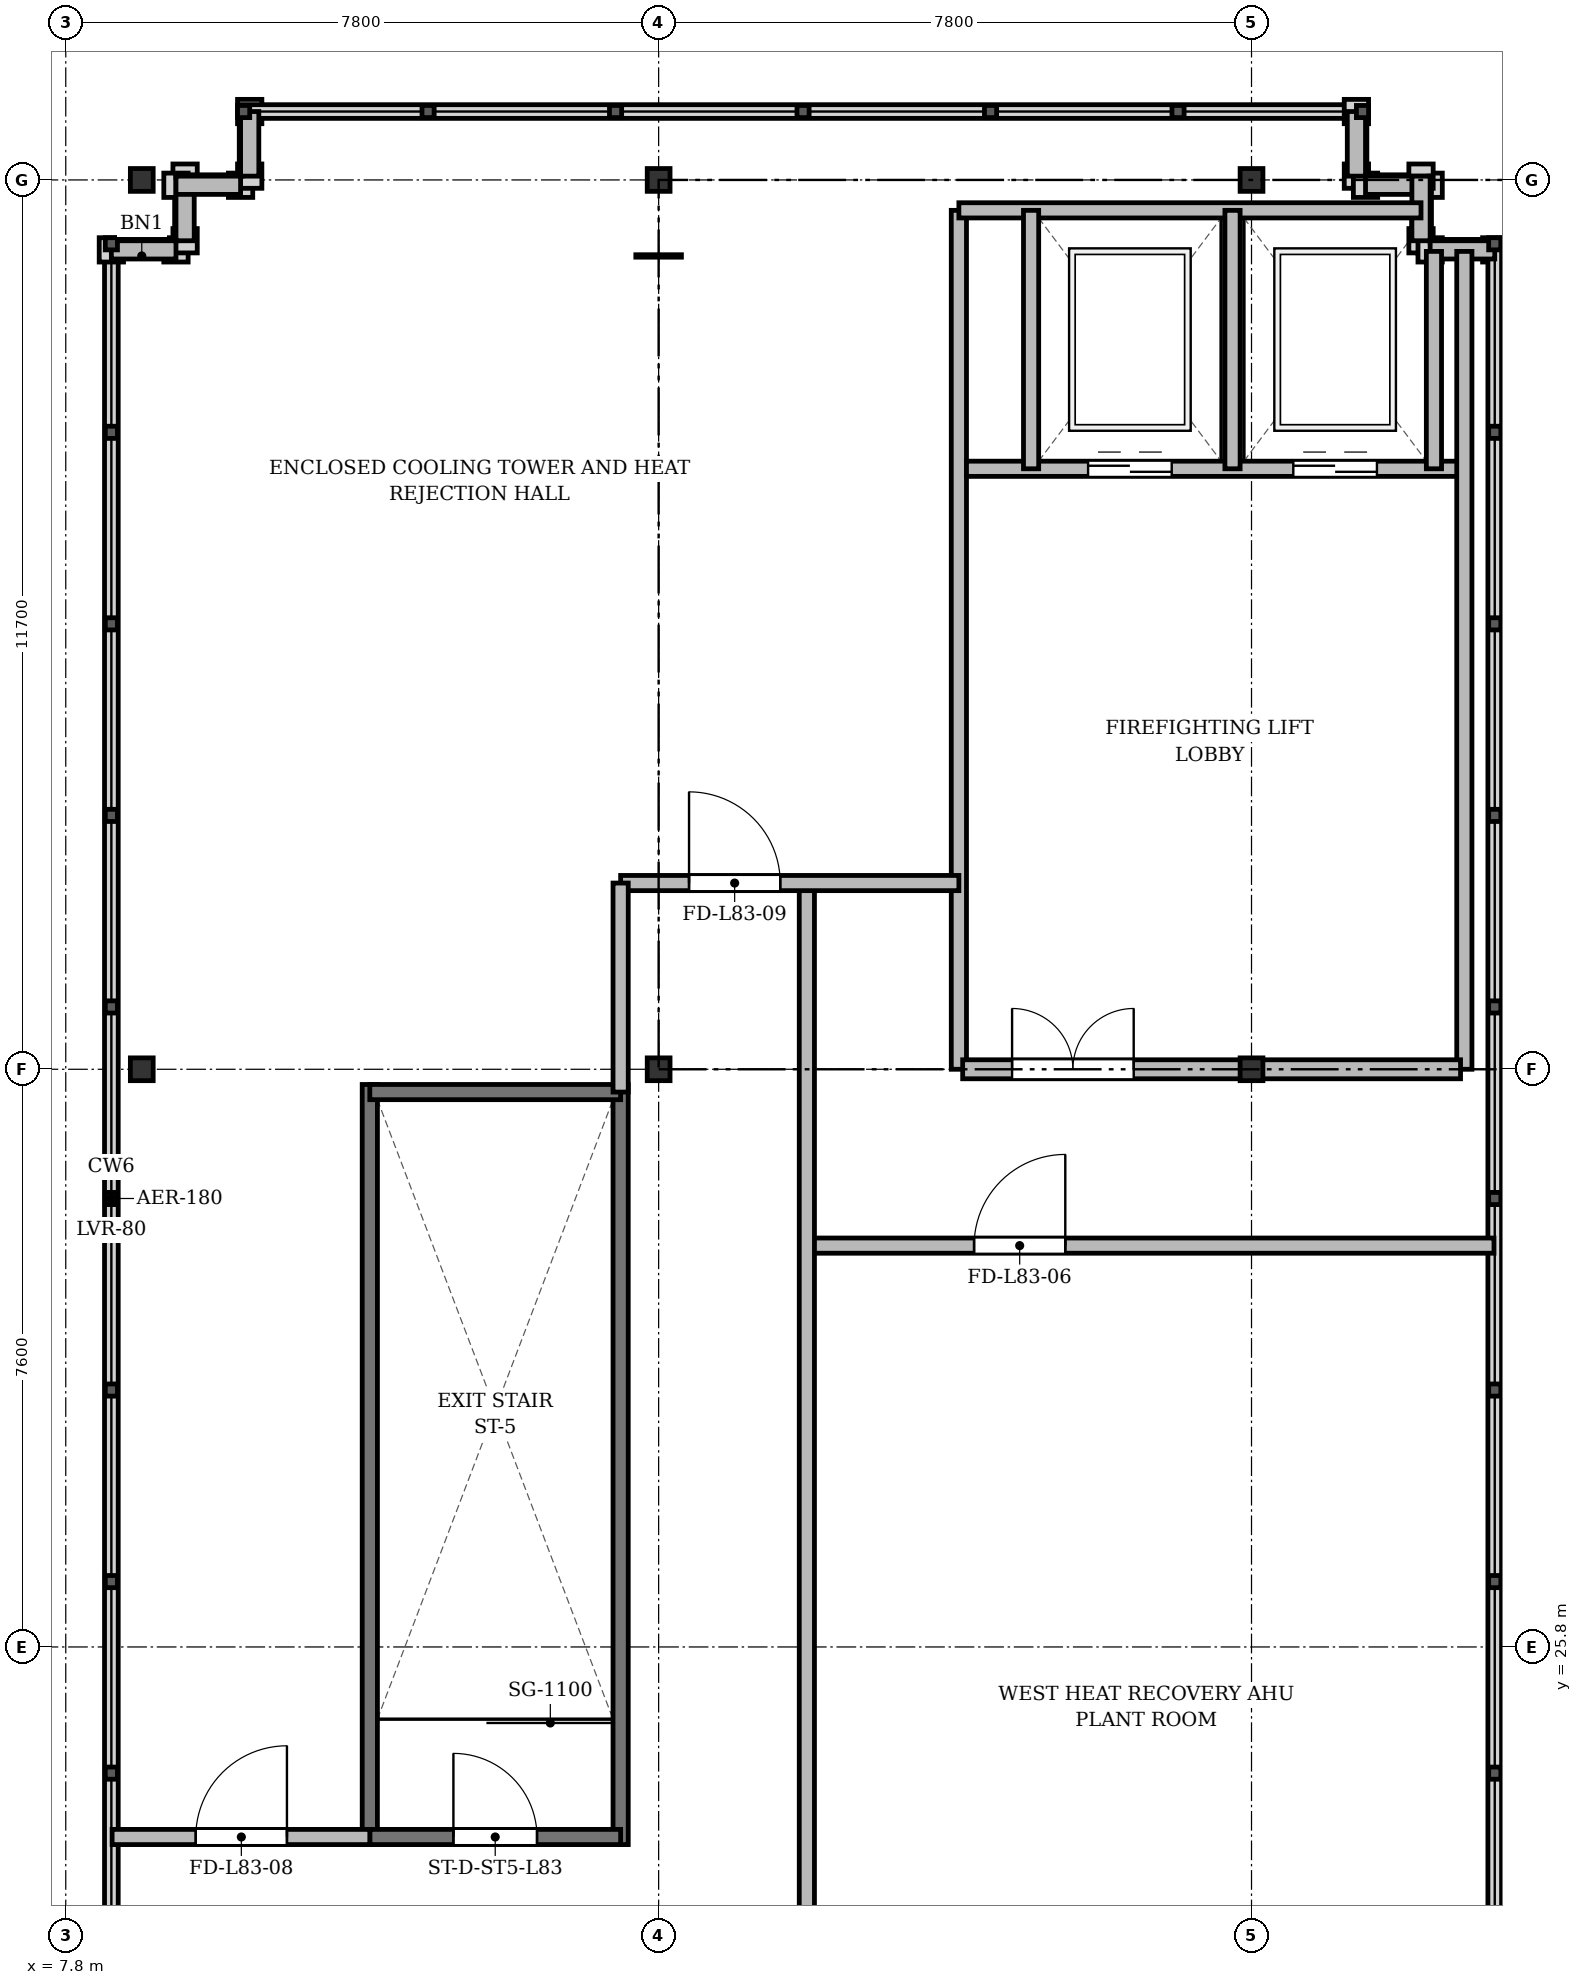
"""IFC4 building model, lengths in metres.
Left out: names, types, materials, properties, quantities, classifications, styles, units other than length and angle.
Written with IfcOpenShell. Run it as: python <this file> out.ifc"""

import sys

from ifc_helpers import new_model, si_unit, direction, frame, frame_2d, origin, origin_2d, place, context, subcontext, project, spatial, rectangle, i_section, extrude, source, transform, mapped, element, fill, save


model = new_model("IFC4")
c1 = context("Model", 3, precision=1e-05, world=origin(), true_north=direction((0.0, 1.0)))
c2 = subcontext(c1, "Body", "Model", "MODEL_VIEW")
j1 = project(units=[si_unit("LENGTHUNIT", "METRE"), si_unit("PLANEANGLEUNIT", "RADIAN")], contexts=[c1])
p1 = place(None, origin())
s1 = spatial("IfcSite", under=j1, at=p1, CompositionType="ELEMENT")
p2 = place(p1, origin())
s2 = spatial("IfcBuilding", under=s1, at=p2, CompositionType="ELEMENT")
p3 = place(p2, frame((0.0, 0.0, 320.9)))
s3 = spatial("IfcBuildingStorey", under=s2, at=p3, CompositionType="ELEMENT", Elevation=320.9)
m1 = source(origin(), c2, "Body", "SweptSolid", [
    extrude(i_section(OverallWidth=0.3, OverallDepth=0.3, WebThickness=0.015, FlangeThickness=0.024, at=origin_2d()), origin(), (0.0, 0.0, 1.0), 4.2),
])
for number, where, z_axis, x_axis in (
    (1, (8.8, 33.4, 0.0), (0.0, 0.0, 1.0), (1.0, 0.0, 0.0)),
    (2, (8.8, 45.1, 0.0), (0.0, 0.0, 1.0), (1.0, 0.0, 0.0)),
    (3, (15.6, 33.4, 0.0), (0.0, 0.0, 1.0), (1.0, 0.0, 0.0)),
    (4, (15.6, 45.1, 0.0), (0.0, 0.0, 1.0), (1.0, 0.0, 0.0)),
    (5, (23.4, 33.4, 0.0), (0.0, 0.0, 1.0), (1.0, 0.0, 0.0)),
    (6, (23.4, 45.1, 0.0), (0.0, 0.0, 1.0), (1.0, 0.0, 0.0)),
):
    element("IfcColumn", number, at=place(p3, frame(where, z_axis=z_axis, x_axis=x_axis)), inside=s3, PredefinedType="COLUMN", context=c2, shape_type="MappedRepresentation", body=[
        mapped(m1, transform((0.0, 0.0, 0.0), x_axis=(1.0, 0.0, 0.0), y_axis=(0.0, 1.0, 0.0), z_axis=(0.0, 0.0, 1.0), scale=1.0)),
    ])
p4 = place(p3, frame((8.4, 44.18, 0.0), z_axis=(0.0, 0.0, 1.0), x_axis=(1.0, 0.0, 0.0)))
e7 = element("IfcWall", 7, at=p4, inside=s3, PredefinedType="SOLIDWALL", context=c2, shape_type="SweptSolid", body=[
    extrude(rectangle(XDim=0.85, YDim=0.24, at=frame_2d((0.425, 0.0))), origin(), (0.0, 0.0, 1.0), 3.4),
])
p5 = place(p3, frame((9.37, 44.3, 0.0), z_axis=(0.0, 0.0, 1.0), x_axis=(0.0, 1.0, 0.0)))
e8 = element("IfcWall", 8, at=p5, inside=s3, PredefinedType="SOLIDWALL", context=c2, shape_type="SweptSolid", body=[
    extrude(rectangle(XDim=0.85, YDim=0.24, at=frame_2d((0.425, 0.0))), origin(), (0.0, 0.0, 1.0), 3.4),
])
for number, where, z_axis, x_axis in (
    (9, (9.25, 45.03, 0.0), (0.0, 0.0, 1.0), (1.0, 0.0, 0.0)),
    (10, (10.22, 45.15, 0.0), (0.0, 0.0, 1.0), (0.0, 1.0, 0.0)),
    (11, (24.78, 46.0, 0.0), (0.0, 0.0, 1.0), (0.0, -1.0, 0.0)),
    (12, (24.9, 45.03, 0.0), (0.0, 0.0, 1.0), (1.0, 0.0, 0.0)),
):
    element("IfcWall", number, at=place(p3, frame(where, z_axis=z_axis, x_axis=x_axis)), inside=s3, PredefinedType="SOLIDWALL", context=c2, shape_type="SweptSolid", body=[
        extrude(rectangle(XDim=0.85, YDim=0.24, at=frame_2d((0.425, 0.0))), origin(), (0.0, 0.0, 1.0), 3.4),
    ])
p6 = place(p3, frame((25.63, 45.15, 0.0), z_axis=(0.0, 0.0, 1.0), x_axis=(0.0, -1.0, 0.0)))
e13 = element("IfcWall", 13, at=p6, inside=s3, PredefinedType="SOLIDWALL", context=c2, shape_type="SweptSolid", body=[
    extrude(rectangle(XDim=0.85, YDim=0.24, at=frame_2d((0.425, 0.0))), origin(), (0.0, 0.0, 1.0), 3.4),
])
p7 = place(p3, frame((25.75, 44.18, 0.0), z_axis=(0.0, 0.0, 1.0), x_axis=(1.0, 0.0, 0.0)))
e14 = element("IfcWall", 14, at=p7, inside=s3, PredefinedType="SOLIDWALL", context=c2, shape_type="SweptSolid", body=[
    extrude(rectangle(XDim=0.85, YDim=0.24, at=frame_2d((0.425, 0.0))), origin(), (0.0, 0.0, 1.0), 3.9),
])
for number, where, z_axis, x_axis in (
    (15, (11.8, 23.2, 0.0), (0.0, 0.0, 1.0), (0.0, 1.0, 0.0)),
    (16, (15.1, 23.2, 0.0), (0.0, 0.0, 1.0), (0.0, 1.0, 0.0)),
):
    element("IfcWall", number, at=place(p3, frame(where, z_axis=z_axis, x_axis=x_axis)), inside=s3, PredefinedType="SHEAR", context=c2, shape_type="SweptSolid", body=[
        extrude(rectangle(XDim=10.0, YDim=0.2, at=frame_2d((5.0, 0.0))), origin(), (0.0, 0.0, 1.0), 3.9),
    ])
p8 = place(p3, frame((11.8, 33.1, 0.0), z_axis=(0.0, 0.0, 1.0), x_axis=(1.0, 0.0, 0.0)))
e17 = element("IfcWall", 17, at=p8, inside=s3, PredefinedType="SHEAR", context=c2, shape_type="SweptSolid", body=[
    extrude(rectangle(XDim=3.3, YDim=0.2, at=frame_2d((1.65, 0.0))), origin(), (0.0, 0.0, 1.0), 3.9),
])
p9 = place(p3, frame((11.8, 23.3, 0.0), z_axis=(0.0, 0.0, 1.0), x_axis=(1.0, 0.0, 0.0)))
e18 = element("IfcWall", 18, at=p9, inside=s3, PredefinedType="SHEAR", context=c2, shape_type="SweptSolid", body=[
    extrude(rectangle(XDim=3.3, YDim=0.2, at=frame_2d((1.65, 0.0))), origin(), (0.0, 0.0, 1.0), 3.9),
])
p10 = place(p9, frame((1.1, 0.0, 0.0)))
e19 = element("IfcOpeningElement", 19, at=p10, cuts=e18, PredefinedType="OPENING", context=c2, shape_type="SweptSolid", body=[
    extrude(rectangle(XDim=1.1, YDim=2.15, at=frame_2d((0.55, 1.075))), frame((0.0, 0.11, 0.0), z_axis=(0.0, -1.0, 0.0), x_axis=(1.0, 0.0, 0.0)), (0.0, 0.0, 1.0), 0.22),
])
p11 = place(p3, frame((19.55, 33.4, 0.0), z_axis=(0.0, 0.0, 1.0), x_axis=(0.0, 1.0, 0.0)))
e20 = element("IfcWall", 20, at=p11, inside=s3, PredefinedType="PARTITIONING", context=c2, shape_type="SweptSolid", body=[
    extrude(rectangle(XDim=11.3, YDim=0.2, at=frame_2d((5.65, 0.0))), origin(), (0.0, 0.0, 1.0), 3.4),
])
p12 = place(p3, frame((19.55, 44.7, 0.0), z_axis=(0.0, 0.0, 1.0), x_axis=(1.0, 0.0, 0.0)))
e21 = element("IfcWall", 21, at=p12, inside=s3, PredefinedType="PARTITIONING", context=c2, shape_type="SweptSolid", body=[
    extrude(rectangle(XDim=6.08, YDim=0.2, at=frame_2d((3.04, 0.0))), origin(), (0.0, 0.0, 1.0), 3.4),
])
p13 = place(p3, frame((19.65, 41.3, 0.0), z_axis=(0.0, 0.0, 1.0), x_axis=(1.0, 0.0, 0.0)))
e22 = element("IfcWall", 22, at=p13, inside=s3, PredefinedType="SOLIDWALL", context=c2, shape_type="SweptSolid", body=[
    extrude(rectangle(XDim=6.5, YDim=0.2, at=frame_2d((3.25, 0.0))), origin(), (0.0, 0.0, 1.0), 3.4),
])
p14 = place(p13, frame((1.6, 0.0, 0.0)))
e23 = element("IfcOpeningElement", 23, at=p14, cuts=e22, PredefinedType="OPENING", context=c2, shape_type="SweptSolid", body=[
    extrude(rectangle(XDim=1.1, YDim=2.15, at=frame_2d((0.55, 1.075))), frame((0.0, 0.11, 0.0), z_axis=(0.0, -1.0, 0.0), x_axis=(1.0, 0.0, 0.0)), (0.0, 0.0, 1.0), 0.22),
])
p15 = place(p13, frame((4.3, 0.0, 0.0)))
e24 = element("IfcOpeningElement", 24, at=p15, cuts=e22, PredefinedType="OPENING", context=c2, shape_type="SweptSolid", body=[
    extrude(rectangle(XDim=1.1, YDim=2.15, at=frame_2d((0.55, 1.075))), frame((0.0, 0.11, 0.0), z_axis=(0.0, -1.0, 0.0), x_axis=(1.0, 0.0, 0.0)), (0.0, 0.0, 1.0), 0.22),
])
for number, where, z_axis, x_axis in (
    (25, (20.5, 41.3, 0.0), (0.0, 0.0, 1.0), (0.0, 1.0, 0.0)),
    (26, (23.15, 41.3, 0.0), (0.0, 0.0, 1.0), (0.0, 1.0, 0.0)),
):
    element("IfcWall", number, at=place(p3, frame(where, z_axis=z_axis, x_axis=x_axis)), inside=s3, PredefinedType="SOLIDWALL", context=c2, shape_type="SweptSolid", body=[
        extrude(rectangle(XDim=3.4, YDim=0.2, at=frame_2d((1.7, 0.0))), origin(), (0.0, 0.0, 1.0), 3.9),
    ])
p16 = place(p3, frame((25.8, 41.3, 0.0), z_axis=(0.0, 0.0, 1.0), x_axis=(0.0, 1.0, 0.0)))
e27 = element("IfcWall", 27, at=p16, inside=s3, PredefinedType="SOLIDWALL", context=c2, shape_type="SweptSolid", body=[
    extrude(rectangle(XDim=2.86, YDim=0.2, at=frame_2d((1.43, 0.0))), origin(), (0.0, 0.0, 1.0), 3.9),
])
p17 = place(p3, frame((26.2, 33.4, 0.0), z_axis=(0.0, 0.0, 1.0), x_axis=(0.0, 1.0, 0.0)))
e28 = element("IfcWall", 28, at=p17, inside=s3, PredefinedType="SOLIDWALL", context=c2, shape_type="SweptSolid", body=[
    extrude(rectangle(XDim=10.76, YDim=0.2, at=frame_2d((5.38, 0.0))), origin(), (0.0, 0.0, 1.0), 3.4),
])
p18 = place(p3, frame((19.6, 33.4, 0.0), z_axis=(0.0, 0.0, 1.0), x_axis=(1.0, 0.0, 0.0)))
e29 = element("IfcWall", 29, at=p18, inside=s3, PredefinedType="PARTITIONING", context=c2, shape_type="SweptSolid", body=[
    extrude(rectangle(XDim=6.55, YDim=0.25, at=frame_2d((3.275, 0.0))), origin(), (0.0, 0.0, 1.0), 3.4),
])
p19 = place(p18, frame((0.65, 0.0, 0.0)))
e30 = element("IfcOpeningElement", 30, at=p19, cuts=e29, PredefinedType="OPENING", context=c2, shape_type="SweptSolid", body=[
    extrude(rectangle(XDim=1.6, YDim=2.2, at=frame_2d((0.8, 1.1))), frame((0.0, 0.135, 0.0), z_axis=(0.0, -1.0, 0.0), x_axis=(1.0, 0.0, 0.0)), (0.0, 0.0, 1.0), 0.27),
])
p20 = place(p3, frame((17.55, 31.08, 0.0), z_axis=(0.0, 0.0, 1.0), x_axis=(1.0, 0.0, 0.0)))
e31 = element("IfcWall", 31, at=p20, inside=s3, PredefinedType="PARTITIONING", context=c2, shape_type="SweptSolid", body=[
    extrude(rectangle(XDim=9.04, YDim=0.2, at=frame_2d((4.52, 0.0))), origin(), (0.0, 0.0, 1.0), 3.4),
])
p21 = place(p20, frame((2.2, 0.0, 0.0)))
e32 = element("IfcOpeningElement", 32, at=p21, cuts=e31, PredefinedType="OPENING", context=c2, shape_type="SweptSolid", body=[
    extrude(rectangle(XDim=1.2, YDim=2.15, at=frame_2d((0.6, 1.075))), frame((0.0, 0.11, 0.0), z_axis=(0.0, -1.0, 0.0), x_axis=(1.0, 0.0, 0.0)), (0.0, 0.0, 1.0), 0.22),
])
p22 = place(p3, frame((17.55, 17.41, 0.0), z_axis=(0.0, 0.0, 1.0), x_axis=(0.0, 1.0, 0.0)))
e33 = element("IfcWall", 33, at=p22, inside=s3, PredefinedType="PARTITIONING", context=c2, shape_type="SweptSolid", body=[
    extrude(rectangle(XDim=18.44, YDim=0.2, at=frame_2d((9.22, 0.0))), origin(), (0.0, 0.0, 1.0), 3.4),
])
p23 = place(p3, frame((8.41, 23.3, 0.0), z_axis=(0.0, 0.0, 1.0), x_axis=(1.0, 0.0, 0.0)))
e34 = element("IfcWall", 34, at=p23, inside=s3, PredefinedType="PARTITIONING", context=c2, shape_type="SweptSolid", body=[
    extrude(rectangle(XDim=3.39, YDim=0.2, at=frame_2d((1.695, 0.0))), origin(), (0.0, 0.0, 1.0), 3.4),
])
p24 = place(p23, frame((1.1, 0.0, 0.0)))
e35 = element("IfcOpeningElement", 35, at=p24, cuts=e34, PredefinedType="OPENING", context=c2, shape_type="SweptSolid", body=[
    extrude(rectangle(XDim=1.2, YDim=2.15, at=frame_2d((0.6, 1.075))), frame((0.0, 0.11, 0.0), z_axis=(0.0, -1.0, 0.0), x_axis=(1.0, 0.0, 0.0)), (0.0, 0.0, 1.0), 0.22),
])
p25 = place(p3, frame((15.1, 35.85, 0.0), z_axis=(0.0, 0.0, 1.0), x_axis=(1.0, 0.0, 0.0)))
e36 = element("IfcWall", 36, at=p25, inside=s3, PredefinedType="PARTITIONING", context=c2, shape_type="SweptSolid", body=[
    extrude(rectangle(XDim=4.45, YDim=0.2, at=frame_2d((2.225, 0.0))), origin(), (0.0, 0.0, 1.0), 3.4),
])
p26 = place(p25, frame((0.9, 0.0, 0.0)))
e37 = element("IfcOpeningElement", 37, at=p26, cuts=e36, PredefinedType="OPENING", context=c2, shape_type="SweptSolid", body=[
    extrude(rectangle(XDim=1.2, YDim=2.15, at=frame_2d((0.6, 1.075))), frame((0.0, 0.11, 0.0), z_axis=(0.0, -1.0, 0.0), x_axis=(1.0, 0.0, 0.0)), (0.0, 0.0, 1.0), 0.22),
])
p27 = place(p3, frame((15.1, 33.1, 0.0), z_axis=(0.0, 0.0, 1.0), x_axis=(0.0, 1.0, 0.0)))
e38 = element("IfcWall", 38, at=p27, inside=s3, PredefinedType="PARTITIONING", context=c2, shape_type="SweptSolid", body=[
    extrude(rectangle(XDim=2.75, YDim=0.2, at=frame_2d((1.375, 0.0))), origin(), (0.0, 0.0, 1.0), 3.4),
])
m2 = source(origin(), c2, "Body", "SweptSolid", [
    extrude(rectangle(XDim=1.1, YDim=2.15, at=frame_2d((0.55, 1.075))), frame((0.0, 0.025, 0.0), z_axis=(0.0, -1.0, 0.0), x_axis=(1.0, 0.0, 0.0)), (0.0, 0.0, 1.0), 0.05),
])
p28 = place(p10, origin())
e39 = element("IfcDoor", 39, at=p28, inside=s3, OperationType="SINGLE_SWING_LEFT", PredefinedType="DOOR", context=c2, shape_type="MappedRepresentation", body=[
    mapped(m2, transform((0.0, 0.0, 0.0), x_axis=(1.0, 0.0, 0.0), y_axis=(0.0, 1.0, 0.0), z_axis=(0.0, 0.0, 1.0), scale=1.0)),
])
fill(e19, e39)
p29 = place(p14, origin())
e40 = element("IfcDoor", 40, at=p29, inside=s3, OperationType="DOUBLE_DOOR_SLIDING", PredefinedType="DOOR", context=c2, shape_type="MappedRepresentation", body=[
    mapped(m2, transform((0.0, 0.0, 0.0), x_axis=(1.0, 0.0, 0.0), y_axis=(0.0, 1.0, 0.0), z_axis=(0.0, 0.0, 1.0), scale=1.0)),
])
fill(e23, e40)
p30 = place(p15, origin())
e41 = element("IfcDoor", 41, at=p30, inside=s3, OperationType="DOUBLE_DOOR_SLIDING", PredefinedType="DOOR", context=c2, shape_type="MappedRepresentation", body=[
    mapped(m2, transform((0.0, 0.0, 0.0), x_axis=(1.0, 0.0, 0.0), y_axis=(0.0, 1.0, 0.0), z_axis=(0.0, 0.0, 1.0), scale=1.0)),
])
fill(e24, e41)
m3 = source(origin(), c2, "Body", "SweptSolid", [
    extrude(rectangle(XDim=1.6, YDim=2.2, at=frame_2d((0.8, 1.1))), frame((0.0, 0.025, 0.0), z_axis=(0.0, -1.0, 0.0), x_axis=(1.0, 0.0, 0.0)), (0.0, 0.0, 1.0), 0.05),
])
p31 = place(p19, origin())
e42 = element("IfcDoor", 42, at=p31, inside=s3, OperationType="DOUBLE_DOOR_SINGLE_SWING", PredefinedType="DOOR", context=c2, shape_type="MappedRepresentation", body=[
    mapped(m3, transform((0.0, 0.0, 0.0), x_axis=(1.0, 0.0, 0.0), y_axis=(0.0, 1.0, 0.0), z_axis=(0.0, 0.0, 1.0), scale=1.0)),
])
fill(e30, e42)
m4 = source(origin(), c2, "Body", "SweptSolid", [
    extrude(rectangle(XDim=1.2, YDim=2.15, at=frame_2d((0.6, 1.075))), frame((0.0, 0.025, 0.0), z_axis=(0.0, -1.0, 0.0), x_axis=(1.0, 0.0, 0.0)), (0.0, 0.0, 1.0), 0.05),
])
p32 = place(p21, origin())
e43 = element("IfcDoor", 43, at=p32, inside=s3, OperationType="SINGLE_SWING_RIGHT", PredefinedType="DOOR", context=c2, shape_type="MappedRepresentation", body=[
    mapped(m4, transform((0.0, 0.0, 0.0), x_axis=(1.0, 0.0, 0.0), y_axis=(0.0, 1.0, 0.0), z_axis=(0.0, 0.0, 1.0), scale=1.0)),
])
fill(e32, e43)
p33 = place(p24, origin())
e44 = element("IfcDoor", 44, at=p33, inside=s3, OperationType="SINGLE_SWING_RIGHT", PredefinedType="DOOR", context=c2, shape_type="MappedRepresentation", body=[
    mapped(m4, transform((0.0, 0.0, 0.0), x_axis=(1.0, 0.0, 0.0), y_axis=(0.0, 1.0, 0.0), z_axis=(0.0, 0.0, 1.0), scale=1.0)),
])
fill(e35, e44)
p34 = place(p26, origin())
e45 = element("IfcDoor", 45, at=p34, inside=s3, OperationType="SINGLE_SWING_LEFT", PredefinedType="DOOR", context=c2, shape_type="MappedRepresentation", body=[
    mapped(m4, transform((0.0, 0.0, 0.0), x_axis=(1.0, 0.0, 0.0), y_axis=(0.0, 1.0, 0.0), z_axis=(0.0, 0.0, 1.0), scale=1.0)),
])
fill(e37, e45)
save(model, sys.argv[1])
